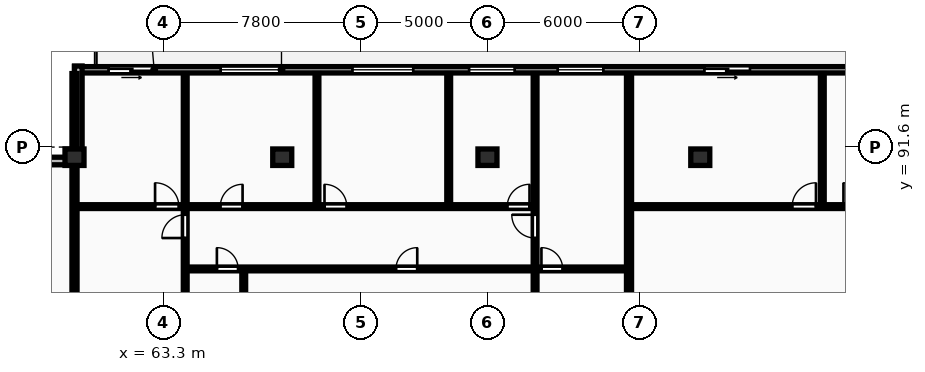
"""IFC4 building model, lengths in metres.
Left out: names, types, materials, properties, quantities, classifications, styles, units other than length and angle.
Written with IfcOpenShell. Run it as: python <this file> out.ifc"""

import sys

from ifc_helpers import new_model, si_unit, direction, frame, frame_2d, origin, origin_2d, place, context, subcontext, project, spatial, rectangle, extrude, element, fill, save


model = new_model("IFC4")
c1 = context("Model", 3, precision=1e-05, world=origin(), true_north=direction((0.0, 1.0)))
c2 = subcontext(c1, "Body", "Model", "MODEL_VIEW")
j1 = project(units=[si_unit("LENGTHUNIT", "METRE"), si_unit("PLANEANGLEUNIT", "RADIAN")], contexts=[c1])
p1 = place(None, origin())
s1 = spatial("IfcSite", under=j1, at=p1, CompositionType="ELEMENT")
p2 = place(p1, origin())
s2 = spatial("IfcBuilding", under=s1, at=p2, CompositionType="ELEMENT")
p3 = place(p2, frame((0.0, 0.0, 235.55)))
s3 = spatial("IfcBuildingStorey", under=s2, at=p3, CompositionType="ELEMENT", Elevation=235.55)
for number, where, z_axis, x_axis in (
    (1, (59.8, 91.2, 0.0), (0.0, 0.0, 1.0), (1.0, 0.0, 0.0)),
    (2, (68.0, 91.2, 0.0), (0.0, 0.0, 1.0), (1.0, 0.0, 0.0)),
    (3, (76.1, 91.2, 0.0), (0.0, 0.0, 1.0), (1.0, 0.0, 0.0)),
    (4, (84.5, 91.2, 0.0), (0.0, 0.0, 1.0), (1.0, 0.0, 0.0)),
):
    element("IfcColumn", number, at=place(p3, frame(where, z_axis=z_axis, x_axis=x_axis)), inside=s3, PredefinedType="COLUMN", context=c2, shape_type="SweptSolid", body=[
        extrude(rectangle(XDim=0.75, YDim=0.65, at=origin_2d()), origin(), (0.0, 0.0, 1.0), 3.45),
    ])
p4 = place(p3, frame((128.4, 94.65, 0.0), z_axis=(0.0, 0.0, 1.0), x_axis=(-1.0, 0.0, 0.0)))
e5 = element("IfcWall", 5, at=p4, inside=s3, PredefinedType="STANDARD", context=c2, shape_type="SweptSolid", body=[
    extrude(rectangle(XDim=68.6, YDim=0.25, at=frame_2d((34.3, 0.0))), origin(), (0.0, 0.0, 1.0), 3.17),
])
p5 = place(p4, frame((60.43, 0.0, 0.85)))
e6 = element("IfcOpeningElement", 6, at=p5, cuts=e5, PredefinedType="OPENING", context=c2, shape_type="SweptSolid", body=[
    extrude(rectangle(XDim=2.4, YDim=1.9, at=frame_2d((1.2, 0.95))), frame((0.0, 0.135, 0.0), z_axis=(0.0, -1.0, 0.0), x_axis=(1.0, 0.0, 0.0)), (0.0, 0.0, 1.0), 0.27),
])
p6 = place(p4, frame((55.23, 0.0, 0.85)))
e7 = element("IfcOpeningElement", 7, at=p6, cuts=e5, PredefinedType="OPENING", context=c2, shape_type="SweptSolid", body=[
    extrude(rectangle(XDim=2.4, YDim=1.9, at=frame_2d((1.2, 0.95))), frame((0.0, 0.135, 0.0), z_axis=(0.0, -1.0, 0.0), x_axis=(1.0, 0.0, 0.0)), (0.0, 0.0, 1.0), 0.27),
])
p7 = place(p4, frame((51.225, 0.0, 0.85)))
e8 = element("IfcOpeningElement", 8, at=p7, cuts=e5, PredefinedType="OPENING", context=c2, shape_type="SweptSolid", body=[
    extrude(rectangle(XDim=1.8, YDim=1.8, at=frame_2d((0.9, 0.9))), frame((0.0, 0.135, 0.0), z_axis=(0.0, -1.0, 0.0), x_axis=(1.0, 0.0, 0.0)), (0.0, 0.0, 1.0), 0.27),
])
p8 = place(p4, frame((65.455, 0.0, 0.0)))
e9 = element("IfcOpeningElement", 9, at=p8, cuts=e5, PredefinedType="OPENING", context=c2, shape_type="SweptSolid", body=[
    extrude(rectangle(XDim=1.8, YDim=2.2, at=frame_2d((0.9, 1.1))), frame((0.0, 0.135, 0.0), z_axis=(0.0, -1.0, 0.0), x_axis=(1.0, 0.0, 0.0)), (0.0, 0.0, 1.0), 0.27),
])
p9 = place(p4, frame((47.726, 0.0, 0.85)))
e10 = element("IfcOpeningElement", 10, at=p9, cuts=e5, PredefinedType="OPENING", context=c2, shape_type="SweptSolid", body=[
    extrude(rectangle(XDim=1.8, YDim=1.8, at=frame_2d((0.9, 0.9))), frame((0.0, 0.135, 0.0), z_axis=(0.0, -1.0, 0.0), x_axis=(1.0, 0.0, 0.0)), (0.0, 0.0, 1.0), 0.27),
])
p10 = place(p4, frame((41.938, 0.0, 0.0)))
e11 = element("IfcOpeningElement", 11, at=p10, cuts=e5, PredefinedType="OPENING", context=c2, shape_type="SweptSolid", body=[
    extrude(rectangle(XDim=1.8, YDim=2.2, at=frame_2d((0.9, 1.1))), frame((0.0, 0.135, 0.0), z_axis=(0.0, -1.0, 0.0), x_axis=(1.0, 0.0, 0.0)), (0.0, 0.0, 1.0), 0.27),
])
p11 = place(p4, frame((32.824, 0.0, 0.85)))
e12 = element("IfcOpeningElement", 12, at=p11, cuts=e5, PredefinedType="OPENING", context=c2, shape_type="SweptSolid", body=[
    extrude(rectangle(XDim=2.4, YDim=1.9, at=frame_2d((1.2, 0.95))), frame((0.0, 0.135, 0.0), z_axis=(0.0, -1.0, 0.0), x_axis=(1.0, 0.0, 0.0)), (0.0, 0.0, 1.0), 0.27),
])
p12 = place(p4, frame((20.245, 0.0, 0.85)))
e13 = element("IfcOpeningElement", 13, at=p12, cuts=e5, PredefinedType="OPENING", context=c2, shape_type="SweptSolid", body=[
    extrude(rectangle(XDim=2.4, YDim=1.9, at=frame_2d((1.2, 0.95))), frame((0.0, 0.135, 0.0), z_axis=(0.0, -1.0, 0.0), x_axis=(1.0, 0.0, 0.0)), (0.0, 0.0, 1.0), 0.27),
])
p13 = place(p4, frame((15.645, 0.0, 0.85)))
e14 = element("IfcOpeningElement", 14, at=p13, cuts=e5, PredefinedType="OPENING", context=c2, shape_type="SweptSolid", body=[
    extrude(rectangle(XDim=2.4, YDim=1.9, at=frame_2d((1.2, 0.95))), frame((0.0, 0.135, 0.0), z_axis=(0.0, -1.0, 0.0), x_axis=(1.0, 0.0, 0.0)), (0.0, 0.0, 1.0), 0.27),
])
p14 = place(p4, frame((25.272, 0.0, 0.0)))
e15 = element("IfcOpeningElement", 15, at=p14, cuts=e5, PredefinedType="OPENING", context=c2, shape_type="SweptSolid", body=[
    extrude(rectangle(XDim=1.8, YDim=2.2, at=frame_2d((0.9, 1.1))), frame((0.0, 0.135, 0.0), z_axis=(0.0, -1.0, 0.0), x_axis=(1.0, 0.0, 0.0)), (0.0, 0.0, 1.0), 0.27),
])
p15 = place(p4, frame((12.11, 0.0, 0.85)))
e16 = element("IfcOpeningElement", 16, at=p15, cuts=e5, PredefinedType="OPENING", context=c2, shape_type="SweptSolid", body=[
    extrude(rectangle(XDim=1.8, YDim=1.8, at=frame_2d((0.9, 0.9))), frame((0.0, 0.135, 0.0), z_axis=(0.0, -1.0, 0.0), x_axis=(1.0, 0.0, 0.0)), (0.0, 0.0, 1.0), 0.27),
])
p16 = place(p4, frame((6.515, 0.0, 0.0)))
e17 = element("IfcOpeningElement", 17, at=p16, cuts=e5, PredefinedType="OPENING", context=c2, shape_type="SweptSolid", body=[
    extrude(rectangle(XDim=1.8, YDim=2.2, at=frame_2d((0.9, 1.1))), frame((0.0, 0.135, 0.0), z_axis=(0.0, -1.0, 0.0), x_axis=(1.0, 0.0, 0.0)), (0.0, 0.0, 1.0), 0.27),
])
p17 = place(p4, frame((0.87, 0.0, 0.85)))
e18 = element("IfcOpeningElement", 18, at=p17, cuts=e5, PredefinedType="OPENING", context=c2, shape_type="SweptSolid", body=[
    extrude(rectangle(XDim=1.8, YDim=1.8, at=frame_2d((0.9, 0.9))), frame((0.0, 0.135, 0.0), z_axis=(0.0, -1.0, 0.0), x_axis=(1.0, 0.0, 0.0)), (0.0, 0.0, 1.0), 0.27),
])
for number, where, z_axis, x_axis in (
    (19, (59.95, 94.8, 0.0), (0.0, 0.0, 1.0), (0.0, -1.0, 0.0)),
    (20, (59.8, 91.05, 0.0), (0.0, 0.0, 1.0), (-1.0, 0.0, 0.0)),
):
    element("IfcWall", number, at=place(p3, frame(where, z_axis=z_axis, x_axis=x_axis)), inside=s3, PredefinedType="STANDARD", context=c2, shape_type="SweptSolid", body=[
        extrude(rectangle(XDim=3.6, YDim=0.3, at=frame_2d((1.8, 0.0))), origin(), (0.0, 0.0, 1.0), 3.17),
    ])
p18 = place(p3, frame((59.8, 70.18, 0.0), z_axis=(0.0, 0.0, 1.0), x_axis=(0.0, 1.0, 0.0)))
e21 = element("IfcWall", 21, at=p18, inside=s3, PredefinedType="PARTITIONING", context=c2, shape_type="SweptSolid", body=[
    extrude(rectangle(XDim=24.32, YDim=0.2, at=frame_2d((12.16, 0.0))), origin(), (0.0, 0.0, 1.0), 2.477),
])
p19 = place(p3, frame((81.687, 70.18, 0.0), z_axis=(0.0, 0.0, 1.0), x_axis=(0.0, 1.0, 0.0)))
e22 = element("IfcWall", 22, at=p19, inside=s3, PredefinedType="PARTITIONING", context=c2, shape_type="SweptSolid", body=[
    extrude(rectangle(XDim=24.32, YDim=0.2, at=frame_2d((12.16, 0.0))), origin(), (0.0, 0.0, 1.0), 3.17),
])
p20 = place(p3, frame((66.48, 84.19, 0.0), z_axis=(0.0, 0.0, 1.0), x_axis=(0.0, 1.0, 0.0)))
e23 = element("IfcWall", 23, at=p20, inside=s3, PredefinedType="PARTITIONING", context=c2, shape_type="SweptSolid", body=[
    extrude(rectangle(XDim=2.58, YDim=0.15, at=frame_2d((1.29, 0.0))), origin(), (0.0, 0.0, 1.0), 3.17),
])
for number, where, z_axis, x_axis in (
    (24, (69.37, 89.33, 0.0), (0.0, 0.0, 1.0), (0.0, 1.0, 0.0)),
    (25, (74.57, 89.33, 0.0), (0.0, 0.0, 1.0), (0.0, 1.0, 0.0)),
):
    element("IfcWall", number, at=place(p3, frame(where, z_axis=z_axis, x_axis=x_axis)), inside=s3, PredefinedType="PARTITIONING", context=c2, shape_type="SweptSolid", body=[
        extrude(rectangle(XDim=5.17, YDim=0.15, at=frame_2d((2.585, 0.0))), origin(), (0.0, 0.0, 1.0), 3.17),
    ])
p21 = place(p3, frame((64.17, 84.19, 0.0), z_axis=(0.0, 0.0, 1.0), x_axis=(0.0, 1.0, 0.0)))
e26 = element("IfcWall", 26, at=p21, inside=s3, PredefinedType="PARTITIONING", context=c2, shape_type="SweptSolid", body=[
    extrude(rectangle(XDim=10.31, YDim=0.15, at=frame_2d((5.155, 0.0))), origin(), (0.0, 0.0, 1.0), 3.17),
])
p22 = place(p21, frame((3.82, 0.0, 0.0)))
e27 = element("IfcOpeningElement", 27, at=p22, cuts=e26, PredefinedType="OPENING", context=c2, shape_type="SweptSolid", body=[
    extrude(rectangle(XDim=0.92, YDim=2.08, at=frame_2d((0.46, 1.04))), frame((0.0, 0.085, 0.0), z_axis=(0.0, -1.0, 0.0), x_axis=(1.0, 0.0, 0.0)), (0.0, 0.0, 1.0), 0.17),
])
p23 = place(p3, frame((77.98, 84.19, 0.0), z_axis=(0.0, 0.0, 1.0), x_axis=(0.0, 1.0, 0.0)))
e28 = element("IfcWall", 28, at=p23, inside=s3, PredefinedType="PARTITIONING", context=c2, shape_type="SweptSolid", body=[
    extrude(rectangle(XDim=2.58, YDim=0.15, at=frame_2d((1.29, 0.0))), origin(), (0.0, 0.0, 1.0), 3.17),
])
p24 = place(p3, frame((77.98, 86.81, 0.0), z_axis=(0.0, 0.0, 1.0), x_axis=(0.0, 1.0, 0.0)))
e29 = element("IfcWall", 29, at=p24, inside=s3, PredefinedType="PARTITIONING", context=c2, shape_type="SweptSolid", body=[
    extrude(rectangle(XDim=7.69, YDim=0.15, at=frame_2d((3.845, 0.0))), origin(), (0.0, 0.0, 1.0), 3.17),
])
p25 = place(p24, frame((1.2, 0.0, 0.0)))
e30 = element("IfcOpeningElement", 30, at=p25, cuts=e29, PredefinedType="OPENING", context=c2, shape_type="SweptSolid", body=[
    extrude(rectangle(XDim=0.92, YDim=2.08, at=frame_2d((0.46, 1.04))), frame((0.0, 0.085, 0.0), z_axis=(0.0, -1.0, 0.0), x_axis=(1.0, 0.0, 0.0)), (0.0, 0.0, 1.0), 0.17),
])
p26 = place(p3, frame((64.21, 86.79, 0.0), z_axis=(0.0, 0.0, 1.0), x_axis=(1.0, 0.0, 0.0)))
e31 = element("IfcWall", 31, at=p26, inside=s3, PredefinedType="PARTITIONING", context=c2, shape_type="SweptSolid", body=[
    extrude(rectangle(XDim=17.397, YDim=0.15, at=frame_2d((8.699, 0.0))), origin(), (0.0, 0.0, 1.0), 3.17),
])
p27 = place(p26, frame((1.21, 0.0, 0.0)))
e32 = element("IfcOpeningElement", 32, at=p27, cuts=e31, PredefinedType="OPENING", context=c2, shape_type="SweptSolid", body=[
    extrude(rectangle(XDim=0.84, YDim=2.04, at=frame_2d((0.42, 1.02))), frame((0.0, 0.085, 0.0), z_axis=(0.0, -1.0, 0.0), x_axis=(1.0, 0.0, 0.0)), (0.0, 0.0, 1.0), 0.17),
])
p28 = place(p26, frame((8.279, 0.0, 0.0)))
e33 = element("IfcOpeningElement", 33, at=p28, cuts=e31, PredefinedType="OPENING", context=c2, shape_type="SweptSolid", body=[
    extrude(rectangle(XDim=0.84, YDim=2.04, at=frame_2d((0.42, 1.02))), frame((0.0, 0.085, 0.0), z_axis=(0.0, -1.0, 0.0), x_axis=(1.0, 0.0, 0.0)), (0.0, 0.0, 1.0), 0.17),
])
p29 = place(p26, frame((14.02, 0.0, 0.0)))
e34 = element("IfcOpeningElement", 34, at=p29, cuts=e31, PredefinedType="OPENING", context=c2, shape_type="SweptSolid", body=[
    extrude(rectangle(XDim=0.84, YDim=2.04, at=frame_2d((0.42, 1.02))), frame((0.0, 0.085, 0.0), z_axis=(0.0, -1.0, 0.0), x_axis=(1.0, 0.0, 0.0)), (0.0, 0.0, 1.0), 0.17),
])
p30 = place(p3, frame((59.88, 89.25, 0.0), z_axis=(0.0, 0.0, 1.0), x_axis=(1.0, 0.0, 0.0)))
e35 = element("IfcWall", 35, at=p30, inside=s3, PredefinedType="PARTITIONING", context=c2, shape_type="SweptSolid", body=[
    extrude(rectangle(XDim=18.1, YDim=0.15, at=frame_2d((9.05, 0.0))), origin(), (0.0, 0.0, 1.0), 3.17),
])
p31 = place(p30, frame((3.1, 0.0, 0.0)))
e36 = element("IfcOpeningElement", 36, at=p31, cuts=e35, PredefinedType="OPENING", context=c2, shape_type="SweptSolid", body=[
    extrude(rectangle(XDim=0.94, YDim=2.1, at=frame_2d((0.47, 1.05))), frame((0.0, 0.085, 0.0), z_axis=(0.0, -1.0, 0.0), x_axis=(1.0, 0.0, 0.0)), (0.0, 0.0, 1.0), 0.17),
])
p32 = place(p30, frame((5.674, 0.0, 0.0)))
e37 = element("IfcOpeningElement", 37, at=p32, cuts=e35, PredefinedType="OPENING", context=c2, shape_type="SweptSolid", body=[
    extrude(rectangle(XDim=0.88, YDim=2.06, at=frame_2d((0.44, 1.03))), frame((0.0, 0.085, 0.0), z_axis=(0.0, -1.0, 0.0), x_axis=(1.0, 0.0, 0.0)), (0.0, 0.0, 1.0), 0.17),
])
p33 = place(p30, frame((9.788, 0.0, 0.0)))
e38 = element("IfcOpeningElement", 38, at=p33, cuts=e35, PredefinedType="OPENING", context=c2, shape_type="SweptSolid", body=[
    extrude(rectangle(XDim=0.88, YDim=2.06, at=frame_2d((0.44, 1.03))), frame((0.0, 0.085, 0.0), z_axis=(0.0, -1.0, 0.0), x_axis=(1.0, 0.0, 0.0)), (0.0, 0.0, 1.0), 0.17),
])
p34 = place(p30, frame((17.0, 0.0, 0.0)))
e39 = element("IfcOpeningElement", 39, at=p34, cuts=e35, PredefinedType="OPENING", context=c2, shape_type="SweptSolid", body=[
    extrude(rectangle(XDim=0.88, YDim=2.06, at=frame_2d((0.44, 1.03))), frame((0.0, 0.085, 0.0), z_axis=(0.0, -1.0, 0.0), x_axis=(1.0, 0.0, 0.0)), (0.0, 0.0, 1.0), 0.17),
])
p35 = place(p3, frame((89.316, 89.33, 0.0), z_axis=(0.0, 0.0, 1.0), x_axis=(0.0, 1.0, 0.0)))
e40 = element("IfcWall", 40, at=p35, inside=s3, PredefinedType="PARTITIONING", context=c2, shape_type="SweptSolid", body=[
    extrude(rectangle(XDim=5.17, YDim=0.15, at=frame_2d((2.585, 0.0))), origin(), (0.0, 0.0, 1.0), 3.17),
])
p36 = place(p3, frame((81.767, 89.25, 0.0), z_axis=(0.0, 0.0, 1.0), x_axis=(1.0, 0.0, 0.0)))
e41 = element("IfcWall", 41, at=p36, inside=s3, PredefinedType="PARTITIONING", context=c2, shape_type="SweptSolid", body=[
    extrude(rectangle(XDim=17.708, YDim=0.15, at=frame_2d((8.854, 0.0))), origin(), (0.0, 0.0, 1.0), 3.17),
])
p37 = place(p36, frame((6.359, 0.0, 0.0)))
e42 = element("IfcOpeningElement", 42, at=p37, cuts=e41, PredefinedType="OPENING", context=c2, shape_type="SweptSolid", body=[
    extrude(rectangle(XDim=0.94, YDim=2.1, at=frame_2d((0.47, 1.05))), frame((0.0, 0.085, 0.0), z_axis=(0.0, -1.0, 0.0), x_axis=(1.0, 0.0, 0.0)), (0.0, 0.0, 1.0), 0.17),
])
p38 = place(p36, frame((8.384, 0.0, 0.0)))
e43 = element("IfcOpeningElement", 43, at=p38, cuts=e41, PredefinedType="OPENING", context=c2, shape_type="SweptSolid", body=[
    extrude(rectangle(XDim=0.94, YDim=2.1, at=frame_2d((0.47, 1.05))), frame((0.0, 0.085, 0.0), z_axis=(0.0, -1.0, 0.0), x_axis=(1.0, 0.0, 0.0)), (0.0, 0.0, 1.0), 0.17),
])
p39 = place(p5, origin())
e44 = element("IfcWindow", 44, at=p39, inside=s3, PartitioningType="DOUBLE_PANEL_VERTICAL", PredefinedType="WINDOW", context=c2, shape_type="SweptSolid", body=[
    extrude(rectangle(XDim=2.4, YDim=1.9, at=frame_2d((1.2, 0.95))), frame((0.0, 0.03, 0.0), z_axis=(0.0, -1.0, 0.0), x_axis=(1.0, 0.0, 0.0)), (0.0, 0.0, 1.0), 0.06),
])
fill(e6, e44)
p40 = place(p6, origin())
e45 = element("IfcWindow", 45, at=p40, inside=s3, PartitioningType="DOUBLE_PANEL_VERTICAL", PredefinedType="WINDOW", context=c2, shape_type="SweptSolid", body=[
    extrude(rectangle(XDim=2.4, YDim=1.9, at=frame_2d((1.2, 0.95))), frame((0.0, 0.03, 0.0), z_axis=(0.0, -1.0, 0.0), x_axis=(1.0, 0.0, 0.0)), (0.0, 0.0, 1.0), 0.06),
])
fill(e7, e45)
p41 = place(p7, origin())
e46 = element("IfcWindow", 46, at=p41, inside=s3, PartitioningType="SINGLE_PANEL", PredefinedType="WINDOW", context=c2, shape_type="SweptSolid", body=[
    extrude(rectangle(XDim=1.8, YDim=1.8, at=frame_2d((0.9, 0.9))), frame((0.0, 0.03, 0.0), z_axis=(0.0, -1.0, 0.0), x_axis=(1.0, 0.0, 0.0)), (0.0, 0.0, 1.0), 0.06),
])
fill(e8, e46)
p42 = place(p8, origin())
e47 = element("IfcDoor", 47, at=p42, inside=s3, OperationType="SLIDING_TO_LEFT", PredefinedType="DOOR", context=c2, shape_type="SweptSolid", body=[
    extrude(rectangle(XDim=1.8, YDim=2.2, at=frame_2d((0.9, 1.1))), frame((0.0, 0.025, 0.0), z_axis=(0.0, -1.0, 0.0), x_axis=(1.0, 0.0, 0.0)), (0.0, 0.0, 1.0), 0.05),
])
fill(e9, e47)
p43 = place(p9, origin())
e48 = element("IfcWindow", 48, at=p43, inside=s3, PartitioningType="SINGLE_PANEL", PredefinedType="WINDOW", context=c2, shape_type="SweptSolid", body=[
    extrude(rectangle(XDim=1.8, YDim=1.8, at=frame_2d((0.9, 0.9))), frame((0.0, 0.03, 0.0), z_axis=(0.0, -1.0, 0.0), x_axis=(1.0, 0.0, 0.0)), (0.0, 0.0, 1.0), 0.06),
])
fill(e10, e48)
p44 = place(p10, origin())
e49 = element("IfcDoor", 49, at=p44, inside=s3, OperationType="SLIDING_TO_LEFT", PredefinedType="DOOR", context=c2, shape_type="SweptSolid", body=[
    extrude(rectangle(XDim=1.8, YDim=2.2, at=frame_2d((0.9, 1.1))), frame((0.0, 0.025, 0.0), z_axis=(0.0, -1.0, 0.0), x_axis=(1.0, 0.0, 0.0)), (0.0, 0.0, 1.0), 0.05),
])
fill(e11, e49)
p45 = place(p22, origin())
e50 = element("IfcDoor", 50, at=p45, inside=s3, OperationType="SINGLE_SWING_LEFT", PredefinedType="DOOR", context=c2, shape_type="SweptSolid", body=[
    extrude(rectangle(XDim=0.92, YDim=2.08, at=frame_2d((0.46, 1.04))), frame((0.0, 0.025, 0.0), z_axis=(0.0, -1.0, 0.0), x_axis=(1.0, 0.0, 0.0)), (0.0, 0.0, 1.0), 0.05),
])
fill(e27, e50)
p46 = place(p25, origin())
e51 = element("IfcDoor", 51, at=p46, inside=s3, OperationType="SINGLE_SWING_RIGHT", PredefinedType="DOOR", context=c2, shape_type="SweptSolid", body=[
    extrude(rectangle(XDim=0.92, YDim=2.08, at=frame_2d((0.46, 1.04))), frame((0.0, 0.025, 0.0), z_axis=(0.0, -1.0, 0.0), x_axis=(1.0, 0.0, 0.0)), (0.0, 0.0, 1.0), 0.05),
])
fill(e30, e51)
p47 = place(p27, origin())
e52 = element("IfcDoor", 52, at=p47, inside=s3, OperationType="SINGLE_SWING_LEFT", PredefinedType="DOOR", context=c2, shape_type="SweptSolid", body=[
    extrude(rectangle(XDim=0.84, YDim=2.04, at=frame_2d((0.42, 1.02))), frame((0.0, 0.025, 0.0), z_axis=(0.0, -1.0, 0.0), x_axis=(1.0, 0.0, 0.0)), (0.0, 0.0, 1.0), 0.05),
])
fill(e32, e52)
p48 = place(p28, origin())
e53 = element("IfcDoor", 53, at=p48, inside=s3, OperationType="SINGLE_SWING_RIGHT", PredefinedType="DOOR", context=c2, shape_type="SweptSolid", body=[
    extrude(rectangle(XDim=0.84, YDim=2.04, at=frame_2d((0.42, 1.02))), frame((0.0, 0.025, 0.0), z_axis=(0.0, -1.0, 0.0), x_axis=(1.0, 0.0, 0.0)), (0.0, 0.0, 1.0), 0.05),
])
fill(e33, e53)
p49 = place(p29, origin())
e54 = element("IfcDoor", 54, at=p49, inside=s3, OperationType="SINGLE_SWING_LEFT", PredefinedType="DOOR", context=c2, shape_type="SweptSolid", body=[
    extrude(rectangle(XDim=0.84, YDim=2.04, at=frame_2d((0.42, 1.02))), frame((0.0, 0.025, 0.0), z_axis=(0.0, -1.0, 0.0), x_axis=(1.0, 0.0, 0.0)), (0.0, 0.0, 1.0), 0.05),
])
fill(e34, e54)
p50 = place(p31, origin())
e55 = element("IfcDoor", 55, at=p50, inside=s3, OperationType="SINGLE_SWING_LEFT", PredefinedType="DOOR", context=c2, shape_type="SweptSolid", body=[
    extrude(rectangle(XDim=0.94, YDim=2.1, at=frame_2d((0.47, 1.05))), frame((0.0, 0.025, 0.0), z_axis=(0.0, -1.0, 0.0), x_axis=(1.0, 0.0, 0.0)), (0.0, 0.0, 1.0), 0.05),
])
fill(e36, e55)
p51 = place(p32, origin())
e56 = element("IfcDoor", 56, at=p51, inside=s3, OperationType="SINGLE_SWING_RIGHT", PredefinedType="DOOR", context=c2, shape_type="SweptSolid", body=[
    extrude(rectangle(XDim=0.88, YDim=2.06, at=frame_2d((0.44, 1.03))), frame((0.0, 0.025, 0.0), z_axis=(0.0, -1.0, 0.0), x_axis=(1.0, 0.0, 0.0)), (0.0, 0.0, 1.0), 0.05),
])
fill(e37, e56)
p52 = place(p33, origin())
e57 = element("IfcDoor", 57, at=p52, inside=s3, OperationType="SINGLE_SWING_LEFT", PredefinedType="DOOR", context=c2, shape_type="SweptSolid", body=[
    extrude(rectangle(XDim=0.88, YDim=2.06, at=frame_2d((0.44, 1.03))), frame((0.0, 0.025, 0.0), z_axis=(0.0, -1.0, 0.0), x_axis=(1.0, 0.0, 0.0)), (0.0, 0.0, 1.0), 0.05),
])
fill(e38, e57)
p53 = place(p34, origin())
e58 = element("IfcDoor", 58, at=p53, inside=s3, OperationType="SINGLE_SWING_RIGHT", PredefinedType="DOOR", context=c2, shape_type="SweptSolid", body=[
    extrude(rectangle(XDim=0.88, YDim=2.06, at=frame_2d((0.44, 1.03))), frame((0.0, 0.025, 0.0), z_axis=(0.0, -1.0, 0.0), x_axis=(1.0, 0.0, 0.0)), (0.0, 0.0, 1.0), 0.05),
])
fill(e39, e58)
p54 = place(p37, origin())
e59 = element("IfcDoor", 59, at=p54, inside=s3, OperationType="SINGLE_SWING_RIGHT", PredefinedType="DOOR", context=c2, shape_type="SweptSolid", body=[
    extrude(rectangle(XDim=0.94, YDim=2.1, at=frame_2d((0.47, 1.05))), frame((0.0, 0.025, 0.0), z_axis=(0.0, -1.0, 0.0), x_axis=(1.0, 0.0, 0.0)), (0.0, 0.0, 1.0), 0.05),
])
fill(e42, e59)
p55 = place(p38, origin())
e60 = element("IfcDoor", 60, at=p55, inside=s3, OperationType="SINGLE_SWING_LEFT", PredefinedType="DOOR", context=c2, shape_type="SweptSolid", body=[
    extrude(rectangle(XDim=0.94, YDim=2.1, at=frame_2d((0.47, 1.05))), frame((0.0, 0.025, 0.0), z_axis=(0.0, -1.0, 0.0), x_axis=(1.0, 0.0, 0.0)), (0.0, 0.0, 1.0), 0.05),
])
fill(e43, e60)
save(model, sys.argv[1])
